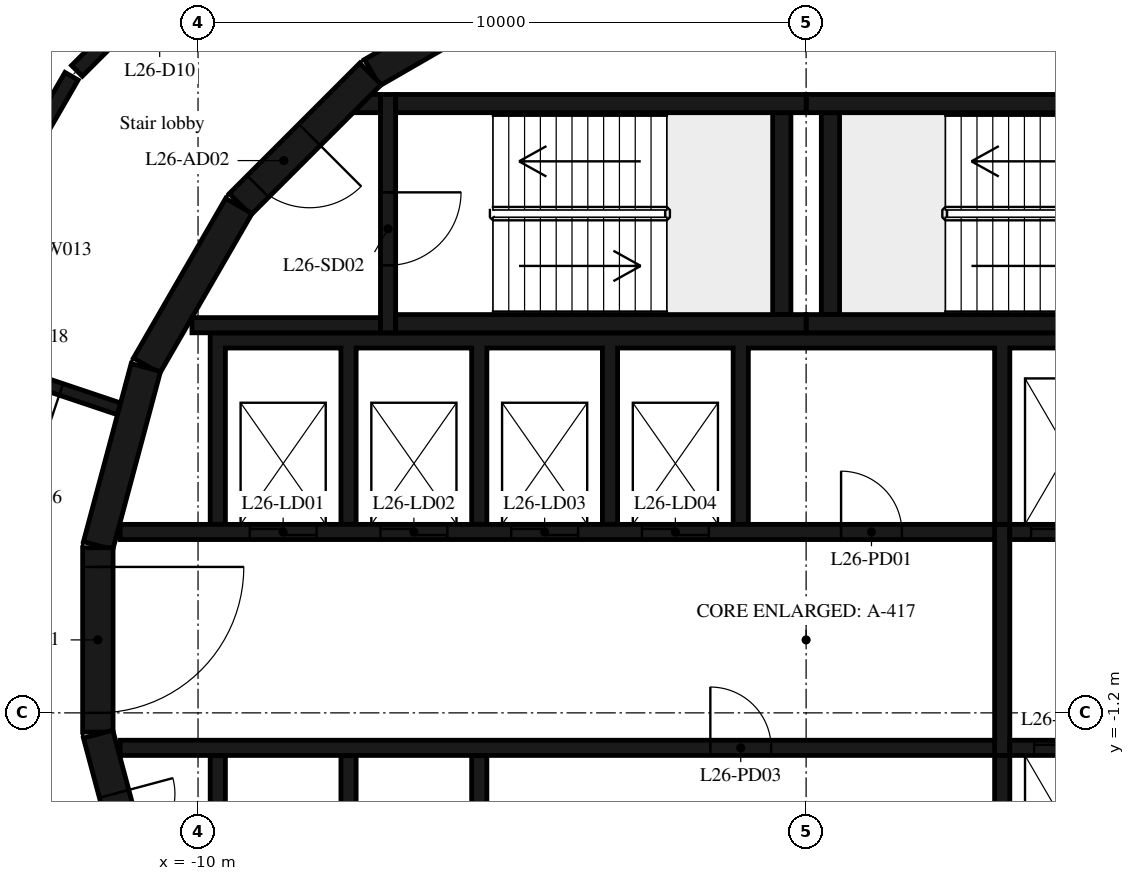
"""IFC4 building model, lengths in metres.
Left out: names, types, materials, properties, quantities, classifications, styles, units other than length and angle.
Written with IfcOpenShell. Run it as: python <this file> out.ifc"""

import sys

from ifc_helpers import new_model, si_unit, direction, frame, frame_2d, origin, place, context, subcontext, project, spatial, polyline, rectangle, outline, extrude, element, fill, save


model = new_model("IFC4")
c1 = context("Model", 3, precision=1e-05, world=origin(), true_north=direction((0.0, 1.0)))
c2 = subcontext(c1, "Body", "Model", "MODEL_VIEW")
j1 = project(units=[si_unit("LENGTHUNIT", "METRE"), si_unit("PLANEANGLEUNIT", "RADIAN")], contexts=[c1])
p1 = place(None, origin())
s1 = spatial("IfcSite", under=j1, at=p1, CompositionType="ELEMENT")
p2 = place(p1, origin())
s2 = spatial("IfcBuilding", under=s1, at=p2, CompositionType="ELEMENT")
p3 = place(p2, frame((0.0, 0.0, 108.2)))
s3 = spatial("IfcBuildingStorey", under=s2, at=p3, CompositionType="ELEMENT", Elevation=108.2)
p4 = place(p3, frame((-4.51, 10.845, 0.0), z_axis=(0.0, 0.0, 1.0), x_axis=(-0.865975092491, -0.500087131594, 0.0)))
e1 = element("IfcWall", 1, at=p4, inside=s3, PredefinedType="SHEAR", context=c2, shape_type="SweptSolid", body=[
    extrude(rectangle(XDim=3.033, YDim=0.5, at=frame_2d((1.516, 0.0))), origin(), (0.0, 0.0, 1.0), 4.75),
])
p5 = place(p3, frame((-7.164, 9.308, 0.0), z_axis=(0.0, 0.0, 1.0), x_axis=(-0.707106781187, -0.707106781187, 0.0)))
e2 = element("IfcWall", 2, at=p5, inside=s3, PredefinedType="SHEAR", context=c2, shape_type="SweptSolid", body=[
    extrude(rectangle(XDim=3.032, YDim=0.5, at=frame_2d((1.516, 0.0))), origin(), (0.0, 0.0, 1.0), 4.75),
])
p6 = place(p5, frame((1.416, 0.0, 0.0)))
e3 = element("IfcOpeningElement", 3, at=p6, cuts=e2, PredefinedType="OPENING", context=c2, shape_type="SweptSolid", body=[
    extrude(rectangle(XDim=1.2, YDim=2.1, at=frame_2d((0.6, 1.05))), frame((0.0, 0.26, 0.0), z_axis=(0.0, -1.0, 0.0), x_axis=(1.0, 0.0, 0.0)), (0.0, 0.0, 1.0), 0.52),
])
for number, where, z_axis, x_axis in (
    (4, (-9.329, 7.137, 0.0), (0.0, 0.0, 1.0), (-0.5, -0.866, 0.0)),
    (5, (-10.858, 4.479, 0.0), (0.0, 0.0, 1.0), (-0.259, -0.966, 0.0)),
):
    element("IfcWall", number, at=place(p3, frame(where, z_axis=z_axis, x_axis=x_axis)), inside=s3, PredefinedType="SHEAR", context=c2, shape_type="SweptSolid", body=[
        extrude(rectangle(XDim=3.033, YDim=0.5, at=frame_2d((1.516, 0.0))), origin(), (0.0, 0.0, 1.0), 4.75),
    ])
p7 = place(p3, frame((-11.647, 1.516, 0.0), z_axis=(0.0, 0.0, 1.0), x_axis=(0.0, -1.0, 0.0)))
e6 = element("IfcWall", 6, at=p7, inside=s3, PredefinedType="SHEAR", context=c2, shape_type="SweptSolid", body=[
    extrude(rectangle(XDim=3.033, YDim=0.5, at=frame_2d((1.516, 0.0))), origin(), (0.0, 0.0, 1.0), 4.75),
])
p8 = place(p7, frame((0.316, 0.0, 0.0)))
e7 = element("IfcOpeningElement", 7, at=p8, cuts=e6, PredefinedType="OPENING", context=c2, shape_type="SweptSolid", body=[
    extrude(rectangle(XDim=2.4, YDim=2.1, at=frame_2d((1.2, 1.05))), frame((0.0, 0.26, 0.0), z_axis=(0.0, -1.0, 0.0), x_axis=(1.0, 0.0, 0.0)), (0.0, 0.0, 1.0), 0.52),
])
p9 = place(p3, frame((-11.643, -1.55, 0.0), z_axis=(0.0, 0.0, 1.0), x_axis=(0.258734743916, -0.965948410781, 0.0)))
e8 = element("IfcWall", 8, at=p9, inside=s3, PredefinedType="SHEAR", context=c2, shape_type="SweptSolid", body=[
    extrude(rectangle(XDim=3.033, YDim=0.5, at=frame_2d((1.516, 0.0))), origin(), (0.0, 0.0, 1.0), 4.75),
])
p10 = place(p9, frame((1.016, 0.0, 0.0)))
e9 = element("IfcOpeningElement", 9, at=p10, cuts=e8, PredefinedType="OPENING", context=c2, shape_type="SweptSolid", body=[
    extrude(rectangle(XDim=1.0, YDim=2.4, at=frame_2d((0.5, 1.2))), frame((0.0, 0.26, 0.0), z_axis=(0.0, -1.0, 0.0), x_axis=(1.0, 0.0, 0.0)), (0.0, 0.0, 1.0), 0.52),
])
for number, where, z_axis, x_axis in (
    (10, (0.0, 5.2, 0.0), (0.0, 0.0, 1.0), (1.0, 0.0, 0.0)),
    (11, (0.0, 8.82, 0.0), (0.0, 0.0, 1.0), (1.0, 0.0, 0.0)),
):
    element("IfcWall", number, at=place(p3, frame(where, z_axis=z_axis, x_axis=x_axis)), inside=s3, PredefinedType="SHEAR", context=c2, shape_type="SweptSolid", body=[
        extrude(rectangle(XDim=6.75, YDim=0.3, at=frame_2d((3.375, 0.0))), origin(), (0.0, 0.0, 1.0), 4.75),
    ])
p11 = place(p3, frame((0.4, 5.35, 0.0), z_axis=(0.0, 0.0, 1.0), x_axis=(0.0, 1.0, 0.0)))
e12 = element("IfcWall", 12, at=p11, inside=s3, PredefinedType="SHEAR", context=c2, shape_type="SweptSolid", body=[
    extrude(rectangle(XDim=3.32, YDim=0.3, at=frame_2d((1.66, 0.0))), origin(), (0.0, 0.0, 1.0), 4.75),
])
for number, where, z_axis, x_axis in (
    (13, (-6.75, 5.2, 0.0), (0.0, 0.0, 1.0), (1.0, 0.0, 0.0)),
    (14, (-6.75, 8.82, 0.0), (0.0, 0.0, 1.0), (1.0, 0.0, 0.0)),
):
    element("IfcWall", number, at=place(p3, frame(where, z_axis=z_axis, x_axis=x_axis)), inside=s3, PredefinedType="SHEAR", context=c2, shape_type="SweptSolid", body=[
        extrude(rectangle(XDim=6.75, YDim=0.3, at=frame_2d((3.375, 0.0))), origin(), (0.0, 0.0, 1.0), 4.75),
    ])
p12 = place(p3, frame((-0.4, 5.35, 0.0), z_axis=(0.0, 0.0, 1.0), x_axis=(0.0, 1.0, 0.0)))
e15 = element("IfcWall", 15, at=p12, inside=s3, PredefinedType="SHEAR", context=c2, shape_type="SweptSolid", body=[
    extrude(rectangle(XDim=3.32, YDim=0.3, at=frame_2d((1.66, 0.0))), origin(), (0.0, 0.0, 1.0), 4.75),
])
p13 = place(p3, frame((-6.875, 8.97, 0.0), z_axis=(0.0, 0.0, 1.0), x_axis=(0.0, -1.0, 0.0)))
e16 = element("IfcWall", 16, at=p13, inside=s3, PredefinedType="SHEAR", context=c2, shape_type="SweptSolid", body=[
    extrude(rectangle(XDim=3.92, YDim=0.25, at=frame_2d((1.96, 0.0))), origin(), (0.0, 0.0, 1.0), 4.75),
])
p14 = place(p13, frame((1.61, 0.0, 0.0)))
e17 = element("IfcOpeningElement", 17, at=p14, cuts=e16, PredefinedType="OPENING", context=c2, shape_type="SweptSolid", body=[
    extrude(rectangle(XDim=1.2, YDim=2.1, at=frame_2d((0.6, 1.05))), frame((0.0, 0.135, 0.0), z_axis=(0.0, -1.0, 0.0), x_axis=(1.0, 0.0, 0.0)), (0.0, 0.0, 1.0), 0.27),
])
p15 = place(p3, frame((-7.0, 5.175, 0.0), z_axis=(0.0, 0.0, 1.0), x_axis=(-1.0, 0.0, 0.0)))
e18 = element("IfcWall", 18, at=p15, inside=s3, PredefinedType="SHEAR", context=c2, shape_type="SweptSolid", body=[
    extrude(rectangle(XDim=3.1, YDim=0.25, at=frame_2d((1.55, 0.0))), origin(), (0.0, 0.0, 1.0), 4.75),
])
p16 = place(p3, origin())
e19 = element("IfcWall", 19, at=p16, inside=s3, PredefinedType="SHEAR", context=c2, shape_type="SweptSolid", body=[
    extrude(outline(polyline([(-7.148, 8.97), (-7.0, 8.97), (-7.0, 8.67), (-7.448, 8.67), (-7.148, 8.97)])), origin(), (0.0, 0.0, 1.0), 4.75),
])
p17 = place(p3, origin())
e20 = element("IfcWall", 20, at=p17, inside=s3, PredefinedType="SHEAR", context=c2, shape_type="SweptSolid", body=[
    extrude(outline(polyline([(-9.55, 4.8), (-7.65, 4.8), (-7.65, 1.9), (-7.4, 1.9), (-7.4, 4.8), (-5.5, 4.8), (-5.5, 1.9), (-5.25, 1.9), (-5.25, 4.8), (-3.35, 4.8), (-3.35, 1.9), (-3.1, 1.9), (-3.1, 4.8), (-1.2, 4.8), (-1.2, 1.9), (-0.95, 1.9), (-0.95, 4.8), (3.1, 4.8), (3.1, 1.9), (3.35, 1.9), (3.35, 4.8), (5.25, 4.8), (5.25, 1.9), (5.5, 1.9), (5.5, 4.8), (7.4, 4.8), (7.4, 1.9), (7.65, 1.9), (7.65, 4.8), (9.55, 4.8), (9.55, 1.9), (9.8, 1.9), (9.8, 4.8), (9.8, 5.05), (-9.8, 5.05), (-9.8, 4.8), (-9.8, 1.9), (-9.55, 1.9), (-9.55, 4.8)])), origin(), (0.0, 0.0, 1.0), 4.75),
])
p18 = place(p3, origin())
e21 = element("IfcWall", 21, at=p18, inside=s3, PredefinedType="SHEAR", context=c2, shape_type="SweptSolid", body=[
    extrude(outline(polyline([(9.8, -5.05), (9.8, -4.8), (9.8, -1.9), (9.55, -1.9), (9.55, -4.8), (7.65, -4.8), (7.65, -1.9), (7.4, -1.9), (7.4, -4.8), (5.5, -4.8), (5.5, -1.9), (5.25, -1.9), (5.25, -4.8), (3.35, -4.8), (3.35, -1.9), (3.1, -1.9), (3.1, -4.8), (-5.25, -4.8), (-5.25, -1.9), (-5.5, -1.9), (-5.5, -4.8), (-7.4, -4.8), (-7.4, -1.9), (-7.65, -1.9), (-7.65, -4.8), (-9.55, -4.8), (-9.55, -1.9), (-9.8, -1.9), (-9.8, -4.8), (-9.8, -5.05), (9.8, -5.05)])), origin(), (0.0, 0.0, 1.0), 4.75),
])
p19 = place(p3, frame((-11.28, 1.775, 0.0), z_axis=(0.0, 0.0, 1.0), x_axis=(1.0, 0.0, 0.0)))
e22 = element("IfcWall", 22, at=p19, inside=s3, PredefinedType="SHEAR", context=c2, shape_type="SweptSolid", body=[
    extrude(rectangle(XDim=14.38, YDim=0.25, at=frame_2d((7.19, 0.0))), origin(), (0.0, 0.0, 1.0), 4.75),
])
p20 = place(p19, frame((2.13, 0.0, 0.0)))
e23 = element("IfcOpeningElement", 23, at=p20, cuts=e22, PredefinedType="OPENING", context=c2, shape_type="SweptSolid", body=[
    extrude(rectangle(XDim=1.1, YDim=2.1, at=frame_2d((0.55, 1.05))), frame((0.0, 0.135, 0.0), z_axis=(0.0, -1.0, 0.0), x_axis=(1.0, 0.0, 0.0)), (0.0, 0.0, 1.0), 0.27),
])
p21 = place(p19, frame((4.28, 0.0, 0.0)))
e24 = element("IfcOpeningElement", 24, at=p21, cuts=e22, PredefinedType="OPENING", context=c2, shape_type="SweptSolid", body=[
    extrude(rectangle(XDim=1.1, YDim=2.1, at=frame_2d((0.55, 1.05))), frame((0.0, 0.135, 0.0), z_axis=(0.0, -1.0, 0.0), x_axis=(1.0, 0.0, 0.0)), (0.0, 0.0, 1.0), 0.27),
])
p22 = place(p19, frame((6.43, 0.0, 0.0)))
e25 = element("IfcOpeningElement", 25, at=p22, cuts=e22, PredefinedType="OPENING", context=c2, shape_type="SweptSolid", body=[
    extrude(rectangle(XDim=1.1, YDim=2.1, at=frame_2d((0.55, 1.05))), frame((0.0, 0.135, 0.0), z_axis=(0.0, -1.0, 0.0), x_axis=(1.0, 0.0, 0.0)), (0.0, 0.0, 1.0), 0.27),
])
p23 = place(p19, frame((8.58, 0.0, 0.0)))
e26 = element("IfcOpeningElement", 26, at=p23, cuts=e22, PredefinedType="OPENING", context=c2, shape_type="SweptSolid", body=[
    extrude(rectangle(XDim=1.1, YDim=2.1, at=frame_2d((0.55, 1.05))), frame((0.0, 0.135, 0.0), z_axis=(0.0, -1.0, 0.0), x_axis=(1.0, 0.0, 0.0)), (0.0, 0.0, 1.0), 0.27),
])
p24 = place(p19, frame((11.855, 0.0, 0.0)))
e27 = element("IfcOpeningElement", 27, at=p24, cuts=e22, PredefinedType="OPENING", context=c2, shape_type="SweptSolid", body=[
    extrude(rectangle(XDim=1.0, YDim=2.4, at=frame_2d((0.5, 1.2))), frame((0.0, 0.135, 0.0), z_axis=(0.0, -1.0, 0.0), x_axis=(1.0, 0.0, 0.0)), (0.0, 0.0, 1.0), 0.27),
])
p25 = place(p3, frame((3.35, 1.775, 0.0), z_axis=(0.0, 0.0, 1.0), x_axis=(1.0, 0.0, 0.0)))
e28 = element("IfcWall", 28, at=p25, inside=s3, PredefinedType="SHEAR", context=c2, shape_type="SweptSolid", body=[
    extrude(rectangle(XDim=7.93, YDim=0.25, at=frame_2d((3.965, 0.0))), origin(), (0.0, 0.0, 1.0), 4.75),
])
p26 = place(p25, frame((0.35, 0.0, 0.0)))
e29 = element("IfcOpeningElement", 29, at=p26, cuts=e28, PredefinedType="OPENING", context=c2, shape_type="SweptSolid", body=[
    extrude(rectangle(XDim=1.2, YDim=2.4, at=frame_2d((0.6, 1.2))), frame((0.0, 0.135, 0.0), z_axis=(0.0, -1.0, 0.0), x_axis=(1.0, 0.0, 0.0)), (0.0, 0.0, 1.0), 0.27),
])
p27 = place(p25, frame((2.5, 0.0, 0.0)))
e30 = element("IfcOpeningElement", 30, at=p27, cuts=e28, PredefinedType="OPENING", context=c2, shape_type="SweptSolid", body=[
    extrude(rectangle(XDim=1.2, YDim=2.4, at=frame_2d((0.6, 1.2))), frame((0.0, 0.135, 0.0), z_axis=(0.0, -1.0, 0.0), x_axis=(1.0, 0.0, 0.0)), (0.0, 0.0, 1.0), 0.27),
])
p28 = place(p25, frame((4.75, 0.0, 0.0)))
e31 = element("IfcOpeningElement", 31, at=p28, cuts=e28, PredefinedType="OPENING", context=c2, shape_type="SweptSolid", body=[
    extrude(rectangle(XDim=1.0, YDim=2.4, at=frame_2d((0.5, 1.2))), frame((0.0, 0.135, 0.0), z_axis=(0.0, -1.0, 0.0), x_axis=(1.0, 0.0, 0.0)), (0.0, 0.0, 1.0), 0.27),
])
p29 = place(p3, frame((-11.28, -1.775, 0.0), z_axis=(0.0, 0.0, 1.0), x_axis=(1.0, 0.0, 0.0)))
e32 = element("IfcWall", 32, at=p29, inside=s3, PredefinedType="SHEAR", context=c2, shape_type="SweptSolid", body=[
    extrude(rectangle(XDim=14.38, YDim=0.25, at=frame_2d((7.19, 0.0))), origin(), (0.0, 0.0, 1.0), 4.75),
])
p30 = place(p29, frame((9.705, 0.0, 0.0)))
e33 = element("IfcOpeningElement", 33, at=p30, cuts=e32, PredefinedType="OPENING", context=c2, shape_type="SweptSolid", body=[
    extrude(rectangle(XDim=1.0, YDim=2.4, at=frame_2d((0.5, 1.2))), frame((0.0, 0.135, 0.0), z_axis=(0.0, -1.0, 0.0), x_axis=(1.0, 0.0, 0.0)), (0.0, 0.0, 1.0), 0.27),
])
p31 = place(p3, frame((3.35, -1.775, 0.0), z_axis=(0.0, 0.0, 1.0), x_axis=(1.0, 0.0, 0.0)))
e34 = element("IfcWall", 34, at=p31, inside=s3, PredefinedType="SHEAR", context=c2, shape_type="SweptSolid", body=[
    extrude(rectangle(XDim=7.93, YDim=0.25, at=frame_2d((3.965, 0.0))), origin(), (0.0, 0.0, 1.0), 4.75),
])
p32 = place(p31, frame((0.4, 0.0, 0.0)))
e35 = element("IfcOpeningElement", 35, at=p32, cuts=e34, PredefinedType="OPENING", context=c2, shape_type="SweptSolid", body=[
    extrude(rectangle(XDim=1.1, YDim=2.4, at=frame_2d((0.55, 1.2))), frame((0.0, 0.135, 0.0), z_axis=(0.0, -1.0, 0.0), x_axis=(1.0, 0.0, 0.0)), (0.0, 0.0, 1.0), 0.27),
])
p33 = place(p31, frame((2.55, 0.0, 0.0)))
e36 = element("IfcOpeningElement", 36, at=p33, cuts=e34, PredefinedType="OPENING", context=c2, shape_type="SweptSolid", body=[
    extrude(rectangle(XDim=1.1, YDim=2.4, at=frame_2d((0.55, 1.2))), frame((0.0, 0.135, 0.0), z_axis=(0.0, -1.0, 0.0), x_axis=(1.0, 0.0, 0.0)), (0.0, 0.0, 1.0), 0.27),
])
p34 = place(p31, frame((4.7, 0.0, 0.0)))
e37 = element("IfcOpeningElement", 37, at=p34, cuts=e34, PredefinedType="OPENING", context=c2, shape_type="SweptSolid", body=[
    extrude(rectangle(XDim=1.1, YDim=2.4, at=frame_2d((0.55, 1.2))), frame((0.0, 0.135, 0.0), z_axis=(0.0, -1.0, 0.0), x_axis=(1.0, 0.0, 0.0)), (0.0, 0.0, 1.0), 0.27),
])
p35 = place(p3, frame((3.225, -1.9, 0.0), z_axis=(0.0, 0.0, 1.0), x_axis=(0.0, 1.0, 0.0)))
e38 = element("IfcWall", 38, at=p35, inside=s3, PredefinedType="SHEAR", context=c2, shape_type="SweptSolid", body=[
    extrude(rectangle(XDim=3.8, YDim=0.25, at=frame_2d((1.9, 0.0))), origin(), (0.0, 0.0, 1.0), 4.75),
])
p36 = place(p3, frame((-12.08, 9.27, 0.0), z_axis=(0.0, 0.0, 1.0), x_axis=(-0.499821239653, -0.866128586522, 0.0)))
e39 = element("IfcWall", 39, at=p36, inside=s3, PredefinedType="PARTITIONING", context=c2, shape_type="SweptSolid", body=[
    extrude(rectangle(XDim=2.496, YDim=0.25, at=frame_2d((1.248, 0.0))), origin(), (0.0, 0.0, 1.0), 4.75),
])
p37 = place(p3, frame((-11.3, 3.8, 0.0), z_axis=(0.0, 0.0, 1.0), x_axis=(-0.94805712629, 0.318100118345, 0.0)))
e40 = element("IfcWall", 40, at=p37, inside=s3, PredefinedType="PARTITIONING", context=c2, shape_type="SweptSolid", body=[
    extrude(rectangle(XDim=3.207, YDim=0.2, at=frame_2d((1.603, 0.0))), origin(), (0.0, 0.0, 1.0), 4.75),
])
p38 = place(p37, frame((1.003, 0.0, 0.0)))
e41 = element("IfcOpeningElement", 41, at=p38, cuts=e40, PredefinedType="OPENING", context=c2, shape_type="SweptSolid", body=[
    extrude(rectangle(XDim=1.2, YDim=2.1, at=frame_2d((0.6, 1.05))), frame((0.0, 0.11, 0.0), z_axis=(0.0, -1.0, 0.0), x_axis=(1.0, 0.0, 0.0)), (0.0, 0.0, 1.0), 0.22),
])
p39 = place(p3, frame((-9.27, 12.08, 0.0), z_axis=(0.0, 0.0, 1.0), x_axis=(-0.707106781187, -0.707106781187, 0.0)))
e42 = element("IfcWall", 42, at=p39, inside=s3, PredefinedType="PARTITIONING", context=c2, shape_type="SweptSolid", body=[
    extrude(rectangle(XDim=3.849, YDim=0.25, at=frame_2d((1.925, 0.0))), origin(), (0.0, 0.0, 1.0), 4.75),
])
p40 = place(p39, frame((1.425, 0.0, 0.0)))
e43 = element("IfcOpeningElement", 43, at=p40, cuts=e42, PredefinedType="OPENING", context=c2, shape_type="SweptSolid", body=[
    extrude(rectangle(XDim=1.0, YDim=2.1, at=frame_2d((0.5, 1.05))), frame((0.0, 0.135, 0.0), z_axis=(0.0, -1.0, 0.0), x_axis=(1.0, 0.0, 0.0)), (0.0, 0.0, 1.0), 0.27),
])
p41 = place(p14, origin())
e44 = element("IfcDoor", 44, at=p41, inside=s3, OperationType="SINGLE_SWING_LEFT", PredefinedType="DOOR", context=c2, shape_type="SweptSolid", body=[
    extrude(rectangle(XDim=1.2, YDim=2.1, at=frame_2d((0.6, 1.05))), frame((0.0, 0.025, 0.0), z_axis=(0.0, -1.0, 0.0), x_axis=(1.0, 0.0, 0.0)), (0.0, 0.0, 1.0), 0.05),
])
fill(e17, e44)
p42 = place(p6, origin())
e45 = element("IfcDoor", 45, at=p42, inside=s3, OperationType="SINGLE_SWING_RIGHT", PredefinedType="DOOR", context=c2, shape_type="SweptSolid", body=[
    extrude(rectangle(XDim=1.2, YDim=2.1, at=frame_2d((0.6, 1.05))), frame((0.0, 0.025, 0.0), z_axis=(0.0, -1.0, 0.0), x_axis=(1.0, 0.0, 0.0)), (0.0, 0.0, 1.0), 0.05),
])
fill(e3, e45)
p43 = place(p8, origin())
e46 = element("IfcDoor", 46, at=p43, inside=s3, OperationType="DOUBLE_DOOR_SINGLE_SWING", PredefinedType="DOOR", context=c2, shape_type="SweptSolid", body=[
    extrude(rectangle(XDim=2.4, YDim=2.1, at=frame_2d((1.2, 1.05))), frame((0.0, 0.025, 0.0), z_axis=(0.0, -1.0, 0.0), x_axis=(1.0, 0.0, 0.0)), (0.0, 0.0, 1.0), 0.05),
])
fill(e7, e46)
p44 = place(p20, origin())
e47 = element("IfcDoor", 47, at=p44, inside=s3, OperationType="DOUBLE_DOOR_SLIDING", PredefinedType="DOOR", context=c2, shape_type="SweptSolid", body=[
    extrude(rectangle(XDim=1.1, YDim=2.1, at=frame_2d((0.55, 1.05))), frame((0.0, 0.025, 0.0), z_axis=(0.0, -1.0, 0.0), x_axis=(1.0, 0.0, 0.0)), (0.0, 0.0, 1.0), 0.05),
])
fill(e23, e47)
p45 = place(p21, origin())
e48 = element("IfcDoor", 48, at=p45, inside=s3, OperationType="DOUBLE_DOOR_SLIDING", PredefinedType="DOOR", context=c2, shape_type="SweptSolid", body=[
    extrude(rectangle(XDim=1.1, YDim=2.1, at=frame_2d((0.55, 1.05))), frame((0.0, 0.025, 0.0), z_axis=(0.0, -1.0, 0.0), x_axis=(1.0, 0.0, 0.0)), (0.0, 0.0, 1.0), 0.05),
])
fill(e24, e48)
p46 = place(p22, origin())
e49 = element("IfcDoor", 49, at=p46, inside=s3, OperationType="DOUBLE_DOOR_SLIDING", PredefinedType="DOOR", context=c2, shape_type="SweptSolid", body=[
    extrude(rectangle(XDim=1.1, YDim=2.1, at=frame_2d((0.55, 1.05))), frame((0.0, 0.025, 0.0), z_axis=(0.0, -1.0, 0.0), x_axis=(1.0, 0.0, 0.0)), (0.0, 0.0, 1.0), 0.05),
])
fill(e25, e49)
p47 = place(p23, origin())
e50 = element("IfcDoor", 50, at=p47, inside=s3, OperationType="DOUBLE_DOOR_SLIDING", PredefinedType="DOOR", context=c2, shape_type="SweptSolid", body=[
    extrude(rectangle(XDim=1.1, YDim=2.1, at=frame_2d((0.55, 1.05))), frame((0.0, 0.025, 0.0), z_axis=(0.0, -1.0, 0.0), x_axis=(1.0, 0.0, 0.0)), (0.0, 0.0, 1.0), 0.05),
])
fill(e26, e50)
p48 = place(p26, origin())
e51 = element("IfcDoor", 51, at=p48, inside=s3, OperationType="DOUBLE_DOOR_SLIDING", PredefinedType="DOOR", context=c2, shape_type="SweptSolid", body=[
    extrude(rectangle(XDim=1.2, YDim=2.4, at=frame_2d((0.6, 1.2))), frame((0.0, 0.025, 0.0), z_axis=(0.0, -1.0, 0.0), x_axis=(1.0, 0.0, 0.0)), (0.0, 0.0, 1.0), 0.05),
])
fill(e29, e51)
p49 = place(p32, origin())
e52 = element("IfcDoor", 52, at=p49, inside=s3, OperationType="DOUBLE_DOOR_SLIDING", PredefinedType="DOOR", context=c2, shape_type="SweptSolid", body=[
    extrude(rectangle(XDim=1.1, YDim=2.4, at=frame_2d((0.55, 1.2))), frame((0.0, 0.025, 0.0), z_axis=(0.0, -1.0, 0.0), x_axis=(1.0, 0.0, 0.0)), (0.0, 0.0, 1.0), 0.05),
])
fill(e35, e52)
p50 = place(p24, origin())
e53 = element("IfcDoor", 53, at=p50, inside=s3, OperationType="SINGLE_SWING_RIGHT", PredefinedType="DOOR", context=c2, shape_type="SweptSolid", body=[
    extrude(rectangle(XDim=1.0, YDim=2.4, at=frame_2d((0.5, 1.2))), frame((0.0, 0.025, 0.0), z_axis=(0.0, -1.0, 0.0), x_axis=(1.0, 0.0, 0.0)), (0.0, 0.0, 1.0), 0.05),
])
fill(e27, e53)
p51 = place(p30, origin())
e54 = element("IfcDoor", 54, at=p51, inside=s3, OperationType="SINGLE_SWING_RIGHT", PredefinedType="DOOR", context=c2, shape_type="SweptSolid", body=[
    extrude(rectangle(XDim=1.0, YDim=2.4, at=frame_2d((0.5, 1.2))), frame((0.0, 0.025, 0.0), z_axis=(0.0, -1.0, 0.0), x_axis=(1.0, 0.0, 0.0)), (0.0, 0.0, 1.0), 0.05),
])
fill(e33, e54)
p52 = place(p10, origin())
e55 = element("IfcDoor", 55, at=p52, inside=s3, OperationType="SINGLE_SWING_LEFT", PredefinedType="DOOR", context=c2, shape_type="SweptSolid", body=[
    extrude(rectangle(XDim=1.0, YDim=2.4, at=frame_2d((0.5, 1.2))), frame((0.0, 0.025, 0.0), z_axis=(0.0, -1.0, 0.0), x_axis=(1.0, 0.0, 0.0)), (0.0, 0.0, 1.0), 0.05),
])
fill(e9, e55)
p53 = place(p38, origin())
e56 = element("IfcDoor", 56, at=p53, inside=s3, OperationType="SINGLE_SWING_LEFT", PredefinedType="DOOR", context=c2, shape_type="SweptSolid", body=[
    extrude(rectangle(XDim=1.2, YDim=2.1, at=frame_2d((0.6, 1.05))), frame((0.0, 0.025, 0.0), z_axis=(0.0, -1.0, 0.0), x_axis=(1.0, 0.0, 0.0)), (0.0, 0.0, 1.0), 0.05),
])
fill(e41, e56)
save(model, sys.argv[1])
